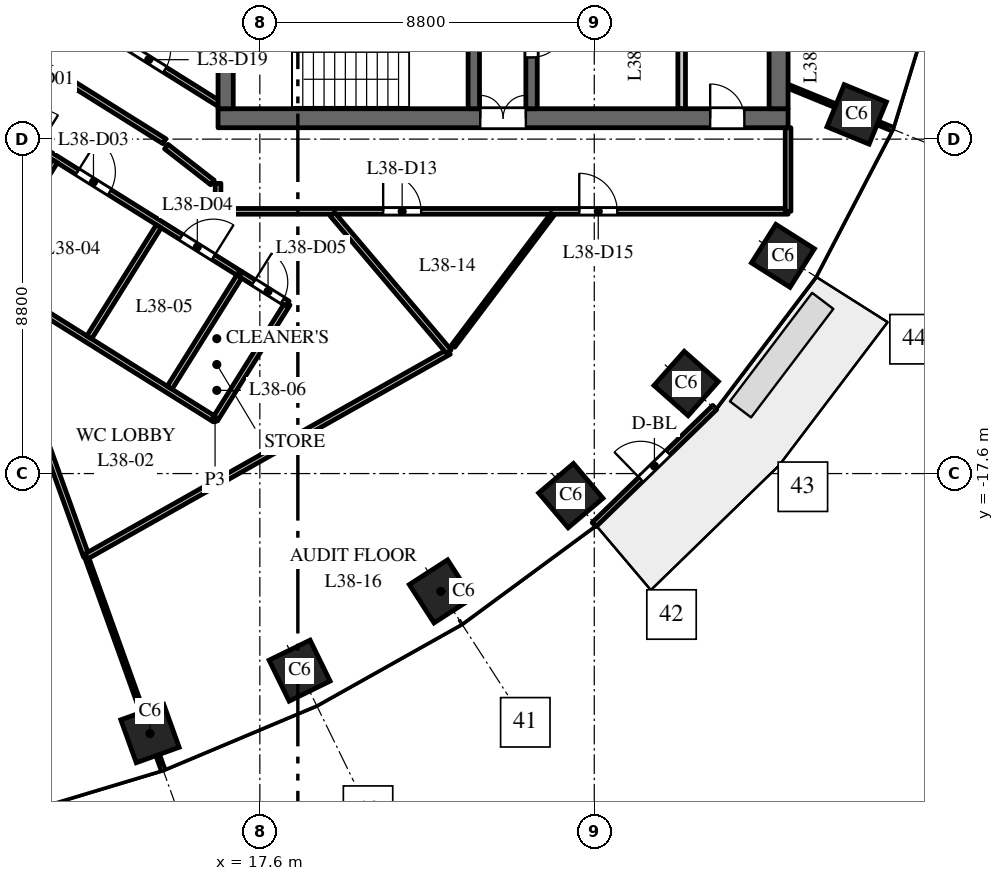
"""IFC4 building model, lengths in metres.
Left out: names, types, materials, properties, quantities, classifications, styles, units other than length and angle.
Written with IfcOpenShell. Run it as: python <this file> out.ifc"""

import sys

from ifc_helpers import new_model, si_unit, direction, frame, frame_2d, origin, origin_2d, place, context, subcontext, project, spatial, rectangle, extrude, element, fill, save


model = new_model("IFC4")
c1 = context("Model", 3, precision=1e-05, world=origin(), true_north=direction((0.0, 1.0)))
c2 = subcontext(c1, "Body", "Model", "MODEL_VIEW")
j1 = project(units=[si_unit("LENGTHUNIT", "METRE"), si_unit("PLANEANGLEUNIT", "RADIAN")], contexts=[c1])
p1 = place(None, origin())
s1 = spatial("IfcSite", under=j1, at=p1, CompositionType="ELEMENT")
p2 = place(p1, origin())
s2 = spatial("IfcBuilding", under=s1, at=p2, CompositionType="ELEMENT")
p3 = place(p2, frame((0.0, 0.0, 166.0)))
s3 = spatial("IfcBuildingStorey", under=s2, at=p3, CompositionType="ELEMENT", Elevation=166.0)
for number, where, z_axis, x_axis in (
    (1, (14.709, -24.441, 0.0), (0.0, 0.0, 1.0), (0.941, 0.338, 0.0)),
    (2, (18.646, -22.785, 0.0), (0.0, 0.0, 1.0), (0.898, 0.439, 0.0)),
    (3, (22.362, -20.7, 0.0), (0.0, 0.0, 1.0), (0.84, 0.542, 0.0)),
    (4, (25.783, -18.18, 0.0), (0.0, 0.0, 1.0), (0.763, 0.646, 0.0)),
    (5, (28.819, -15.23, 0.0), (0.0, 0.0, 1.0), (0.663, 0.749, 0.0)),
    (6, (31.365, -11.871, 0.0), (0.0, 0.0, 1.0), (0.535, 0.845, 0.0)),
    (7, (33.305, -8.149, 0.0), (0.0, 0.0, 1.0), (0.379, 0.925, 0.0)),
):
    element("IfcColumn", number, at=place(p3, frame(where, z_axis=z_axis, x_axis=x_axis)), inside=s3, PredefinedType="COLUMN", context=c2, shape_type="SweptSolid", body=[
        extrude(rectangle(XDim=1.2, YDim=1.2, at=origin_2d()), origin(), (0.0, 0.0, 1.0), 4.0),
    ])
p4 = place(p3, frame((16.5, -8.25, 0.0), z_axis=(0.0, 0.0, 1.0), x_axis=(1.0, 0.0, 0.0)))
e8 = element("IfcWall", 8, at=p4, inside=s3, PredefinedType="SHEAR", context=c2, shape_type="SweptSolid", body=[
    extrude(rectangle(XDim=15.0, YDim=0.5, at=frame_2d((7.5, 0.0))), origin(), (0.0, 0.0, 1.0), 3.7),
])
p5 = place(p4, frame((6.9, 0.0, 0.0)))
e9 = element("IfcOpeningElement", 9, at=p5, cuts=e8, PredefinedType="OPENING", context=c2, shape_type="SweptSolid", body=[
    extrude(rectangle(XDim=1.2, YDim=2.1, at=frame_2d((0.6, 1.05))), frame((0.0, 0.26, 0.0), z_axis=(0.0, -1.0, 0.0), x_axis=(1.0, 0.0, 0.0)), (0.0, 0.0, 1.0), 0.52),
])
p6 = place(p4, frame((12.95, 0.0, 0.0)))
e10 = element("IfcOpeningElement", 10, at=p6, cuts=e8, PredefinedType="OPENING", context=c2, shape_type="SweptSolid", body=[
    extrude(rectangle(XDim=0.9, YDim=2.1, at=frame_2d((0.45, 1.05))), frame((0.0, 0.26, 0.0), z_axis=(0.0, -1.0, 0.0), x_axis=(1.0, 0.0, 0.0)), (0.0, 0.0, 1.0), 0.52),
])
p7 = place(p3, frame((24.75, -8.0, 0.0), z_axis=(0.0, 0.0, 1.0), x_axis=(0.0, 1.0, 0.0)))
e11 = element("IfcWall", 11, at=p7, inside=s3, PredefinedType="SHEAR", context=c2, shape_type="SweptSolid", body=[
    extrude(rectangle(XDim=16.0, YDim=0.3, at=frame_2d((8.0, 0.0))), origin(), (0.0, 0.0, 1.0), 3.7),
])
p8 = place(p7, frame((4.425, 0.0, 0.0)))
e12 = element("IfcOpeningElement", 12, at=p8, cuts=e11, PredefinedType="OPENING", context=c2, shape_type="SweptSolid", body=[
    extrude(rectangle(XDim=1.1, YDim=2.1, at=frame_2d((0.55, 1.05))), frame((0.0, 0.16, 0.0), z_axis=(0.0, -1.0, 0.0), x_axis=(1.0, 0.0, 0.0)), (0.0, 0.0, 1.0), 0.32),
])
p9 = place(p7, frame((7.45, 0.0, 0.0)))
e13 = element("IfcOpeningElement", 13, at=p9, cuts=e11, PredefinedType="OPENING", context=c2, shape_type="SweptSolid", body=[
    extrude(rectangle(XDim=1.1, YDim=2.1, at=frame_2d((0.55, 1.05))), frame((0.0, 0.16, 0.0), z_axis=(0.0, -1.0, 0.0), x_axis=(1.0, 0.0, 0.0)), (0.0, 0.0, 1.0), 0.32),
])
p10 = place(p7, frame((10.475, 0.0, 0.0)))
e14 = element("IfcOpeningElement", 14, at=p10, cuts=e11, PredefinedType="OPENING", context=c2, shape_type="SweptSolid", body=[
    extrude(rectangle(XDim=1.1, YDim=2.1, at=frame_2d((0.55, 1.05))), frame((0.0, 0.16, 0.0), z_axis=(0.0, -1.0, 0.0), x_axis=(1.0, 0.0, 0.0)), (0.0, 0.0, 1.0), 0.32),
])
p11 = place(p7, frame((13.125, 0.0, 0.0)))
e15 = element("IfcOpeningElement", 15, at=p11, cuts=e11, PredefinedType="OPENING", context=c2, shape_type="SweptSolid", body=[
    extrude(rectangle(XDim=0.9, YDim=2.1, at=frame_2d((0.45, 1.05))), frame((0.0, 0.16, 0.0), z_axis=(0.0, -1.0, 0.0), x_axis=(1.0, 0.0, 0.0)), (0.0, 0.0, 1.0), 0.32),
])
p12 = place(p7, frame((14.75, 0.0, 0.0)))
e16 = element("IfcOpeningElement", 16, at=p12, cuts=e11, PredefinedType="OPENING", context=c2, shape_type="SweptSolid", body=[
    extrude(rectangle(XDim=0.9, YDim=2.1, at=frame_2d((0.45, 1.05))), frame((0.0, 0.16, 0.0), z_axis=(0.0, -1.0, 0.0), x_axis=(1.0, 0.0, 0.0)), (0.0, 0.0, 1.0), 0.32),
])
p13 = place(p7, frame((1.35, 0.0, 0.0)))
e17 = element("IfcOpeningElement", 17, at=p13, cuts=e11, PredefinedType="OPENING", context=c2, shape_type="SweptSolid", body=[
    extrude(rectangle(XDim=0.9, YDim=2.1, at=frame_2d((0.45, 1.05))), frame((0.0, 0.16, 0.0), z_axis=(0.0, -1.0, 0.0), x_axis=(1.0, 0.0, 0.0)), (0.0, 0.0, 1.0), 0.32),
])
p14 = place(p3, frame((16.7, -8.0, 0.0), z_axis=(0.0, 0.0, 1.0), x_axis=(0.0, 1.0, 0.0)))
e18 = element("IfcWall", 18, at=p14, inside=s3, PredefinedType="SHEAR", context=c2, shape_type="SweptSolid", body=[
    extrude(rectangle(XDim=16.0, YDim=0.4, at=frame_2d((8.0, 0.0))), origin(), (0.0, 0.0, 1.0), 3.7),
])
p15 = place(p3, frame((31.25, -8.0, 0.0), z_axis=(0.0, 0.0, 1.0), x_axis=(0.0, 1.0, 0.0)))
e19 = element("IfcWall", 19, at=p15, inside=s3, PredefinedType="SHEAR", context=c2, shape_type="SweptSolid", body=[
    extrude(rectangle(XDim=16.0, YDim=0.5, at=frame_2d((8.0, 0.0))), origin(), (0.0, 0.0, 1.0), 3.7),
])
p16 = place(p3, frame((28.7, -8.0, 0.0), z_axis=(0.0, 0.0, 1.0), x_axis=(0.0, 1.0, 0.0)))
e20 = element("IfcWall", 20, at=p16, inside=s3, PredefinedType="PARTITIONING", context=c2, shape_type="SweptSolid", body=[
    extrude(rectangle(XDim=3.25, YDim=0.2, at=frame_2d((1.625, 0.0))), origin(), (0.0, 0.0, 1.0), 3.7),
])
p17 = place(p3, frame((23.23, -8.0, 0.0), z_axis=(0.0, 0.0, 1.0), x_axis=(0.0, 1.0, 0.0)))
e21 = element("IfcWall", 21, at=p17, inside=s3, PredefinedType="SHEAR", context=c2, shape_type="SweptSolid", body=[
    extrude(rectangle(XDim=7.875, YDim=0.3, at=frame_2d((3.938, 0.0))), origin(), (0.0, 0.0, 1.0), 3.7),
])
p18 = place(p17, frame((5.15, 0.0, 0.0)))
e22 = element("IfcOpeningElement", 22, at=p18, cuts=e21, PredefinedType="OPENING", context=c2, shape_type="SweptSolid", body=[
    extrude(rectangle(XDim=1.1, YDim=2.1, at=frame_2d((0.55, 1.05))), frame((0.0, 0.16, 0.0), z_axis=(0.0, -1.0, 0.0), x_axis=(1.0, 0.0, 0.0)), (0.0, 0.0, 1.0), 0.32),
])
p19 = place(p3, frame((26.396, -18.943, 0.0), z_axis=(0.0, 0.0, 1.0), x_axis=(0.717214761864, 0.696852197647, 0.0)))
e23 = element("IfcWall", 23, at=p19, inside=s3, PredefinedType="STANDARD", context=c2, shape_type="SweptSolid", body=[
    extrude(rectangle(XDim=4.424, YDim=0.15, at=frame_2d((2.212, 0.0))), origin(), (0.0, 0.0, 1.0), 3.7),
])
p20 = place(p19, frame((1.712, 0.0, 0.0)))
e24 = element("IfcOpeningElement", 24, at=p20, cuts=e23, PredefinedType="OPENING", context=c2, shape_type="SweptSolid", body=[
    extrude(rectangle(XDim=1.0, YDim=2.4, at=frame_2d((0.5, 1.2))), frame((0.0, 0.085, 0.0), z_axis=(0.0, -1.0, 0.0), x_axis=(1.0, 0.0, 0.0)), (0.0, 0.0, 1.0), 0.17),
])
p21 = place(p3, frame((7.608, -10.661, 0.0), z_axis=(0.0, 0.0, 1.0), x_axis=(0.847562482532, -0.530695617284, 0.0)))
e25 = element("IfcWall", 25, at=p21, inside=s3, PredefinedType="PARTITIONING", context=c2, shape_type="SweptSolid", body=[
    extrude(rectangle(XDim=10.392, YDim=0.15, at=frame_2d((5.196, 0.0))), origin(), (0.0, 0.0, 1.0), 3.7),
])
p22 = place(p3, frame((9.514, -7.61, 0.0), z_axis=(0.0, 0.0, 1.0), x_axis=(0.847740567707, -0.530411095155, 0.0)))
e26 = element("IfcWall", 26, at=p22, inside=s3, PredefinedType="PARTITIONING", context=c2, shape_type="SweptSolid", body=[
    extrude(rectangle(XDim=8.944, YDim=0.15, at=frame_2d((4.472, 0.0))), origin(), (0.0, 0.0, 1.0), 3.7),
])
p23 = place(p22, frame((1.65, 0.0, 0.0)))
e27 = element("IfcOpeningElement", 27, at=p23, cuts=e26, PredefinedType="OPENING", context=c2, shape_type="SweptSolid", body=[
    extrude(rectangle(XDim=1.0, YDim=2.1, at=frame_2d((0.5, 1.05))), frame((0.0, 0.085, 0.0), z_axis=(0.0, -1.0, 0.0), x_axis=(1.0, 0.0, 0.0)), (0.0, 0.0, 1.0), 0.17),
])
p24 = place(p22, frame((3.874, 0.0, 0.0)))
e28 = element("IfcOpeningElement", 28, at=p24, cuts=e26, PredefinedType="OPENING", context=c2, shape_type="SweptSolid", body=[
    extrude(rectangle(XDim=1.0, YDim=2.1, at=frame_2d((0.5, 1.05))), frame((0.0, 0.085, 0.0), z_axis=(0.0, -1.0, 0.0), x_axis=(1.0, 0.0, 0.0)), (0.0, 0.0, 1.0), 0.17),
])
p25 = place(p22, frame((7.098, 0.0, 0.0)))
e29 = element("IfcOpeningElement", 29, at=p25, cuts=e26, PredefinedType="OPENING", context=c2, shape_type="SweptSolid", body=[
    extrude(rectangle(XDim=1.0, YDim=2.1, at=frame_2d((0.5, 1.05))), frame((0.0, 0.085, 0.0), z_axis=(0.0, -1.0, 0.0), x_axis=(1.0, 0.0, 0.0)), (0.0, 0.0, 1.0), 0.17),
])
p26 = place(p3, frame((9.679, -5.469, 0.0), z_axis=(0.0, 0.0, 1.0), x_axis=(0.847602682855, -0.530631408811, 0.0)))
e30 = element("IfcWall", 30, at=p26, inside=s3, PredefinedType="PARTITIONING", context=c2, shape_type="SweptSolid", body=[
    extrude(rectangle(XDim=6.383, YDim=0.15, at=frame_2d((3.191, 0.0))), origin(), (0.0, 0.0, 1.0), 3.7),
])
p27 = place(p26, frame((0.65, 0.0, 0.0)))
e31 = element("IfcOpeningElement", 31, at=p27, cuts=e30, PredefinedType="OPENING", context=c2, shape_type="SweptSolid", body=[
    extrude(rectangle(XDim=1.0, YDim=2.1, at=frame_2d((0.5, 1.05))), frame((0.0, 0.085, 0.0), z_axis=(0.0, -1.0, 0.0), x_axis=(1.0, 0.0, 0.0)), (0.0, 0.0, 1.0), 0.17),
])
p28 = place(p3, frame((10.377, -12.306, 0.0), z_axis=(0.0, 0.0, 1.0), x_axis=(0.530889428354, 0.847441098167, 0.0)))
e32 = element("IfcWall", 32, at=p28, inside=s3, PredefinedType="PARTITIONING", context=c2, shape_type="SweptSolid", body=[
    extrude(rectangle(XDim=3.449, YDim=0.15, at=frame_2d((1.725, 0.0))), origin(), (0.0, 0.0, 1.0), 3.7),
])
p29 = place(p3, frame((10.752, -4.254, 0.0), z_axis=(0.0, 0.0, 1.0), x_axis=(0.847690706888, -0.530490777917, 0.0)))
e33 = element("IfcWall", 33, at=p29, inside=s3, PredefinedType="PARTITIONING", context=c2, shape_type="SweptSolid", body=[
    extrude(rectangle(XDim=6.781, YDim=0.15, at=frame_2d((3.39, 0.0))), origin(), (0.0, 0.0, 1.0), 3.7),
])
p30 = place(p29, frame((4.129, 0.0, 0.0)))
e34 = element("IfcOpeningElement", 34, at=p30, cuts=e33, PredefinedType="OPENING", context=c2, shape_type="SweptSolid", body=[
    extrude(rectangle(XDim=1.0, YDim=2.1, at=frame_2d((0.5, 1.05))), frame((0.0, 0.085, 0.0), z_axis=(0.0, -1.0, 0.0), x_axis=(1.0, 0.0, 0.0)), (0.0, 0.0, 1.0), 0.17),
])
p31 = place(p3, frame((11.429, -15.32, 0.0), z_axis=(0.0, 0.0, 1.0), x_axis=(0.338520464006, -0.940959029634, 0.0)))
e35 = element("IfcWall", 35, at=p31, inside=s3, PredefinedType="PARTITIONING", context=c2, shape_type="SweptSolid", body=[
    extrude(rectangle(XDim=4.735, YDim=0.15, at=frame_2d((2.368, 0.0))), origin(), (0.0, 0.0, 1.0), 3.7),
])
p32 = place(p3, frame((13.032, -19.776, 0.0), z_axis=(0.0, 0.0, 1.0), x_axis=(0.338352371411, -0.941019485856, 0.0)))
e36 = element("IfcWall", 36, at=p32, inside=s3, PredefinedType="PARTITIONING", context=c2, shape_type="SweptSolid", body=[
    extrude(rectangle(XDim=5.959, YDim=0.1, at=frame_2d((2.979, 0.0))), origin(), (0.0, 0.0, 1.0), 2.85),
])
p33 = place(p3, frame((13.034, -19.779, 0.0), z_axis=(0.0, 0.0, 1.0), x_axis=(0.870903388322, 0.491454258512, 0.0)))
e37 = element("IfcWall", 37, at=p33, inside=s3, PredefinedType="PARTITIONING", context=c2, shape_type="SweptSolid", body=[
    extrude(rectangle(XDim=10.955, YDim=0.15, at=frame_2d((5.478, 0.0))), origin(), (0.0, 0.0, 1.0), 3.7),
])
p34 = place(p3, frame((13.11, -14.017, 0.0), z_axis=(0.0, 0.0, 1.0), x_axis=(0.530603340991, 0.847620253727, 0.0)))
e38 = element("IfcWall", 38, at=p34, inside=s3, PredefinedType="PARTITIONING", context=c2, shape_type="SweptSolid", body=[
    extrude(rectangle(XDim=3.448, YDim=0.15, at=frame_2d((1.724, 0.0))), origin(), (0.0, 0.0, 1.0), 3.7),
])
p35 = place(p3, frame((15.226, -15.341, 0.0), z_axis=(0.0, 0.0, 1.0), x_axis=(0.530602850446, 0.847620560805, 0.0)))
e39 = element("IfcWall", 39, at=p35, inside=s3, PredefinedType="PARTITIONING", context=c2, shape_type="SweptSolid", body=[
    extrude(rectangle(XDim=3.524, YDim=0.15, at=frame_2d((1.762, 0.0))), origin(), (0.0, 0.0, 1.0), 3.7),
])
p36 = place(p3, frame((16.422, -16.175, 0.0), z_axis=(0.0, 0.0, 1.0), x_axis=(0.530578570881, 0.84763575911, 0.0)))
e40 = element("IfcWall", 40, at=p36, inside=s3, PredefinedType="PARTITIONING", context=c2, shape_type="SweptSolid", body=[
    extrude(rectangle(XDim=3.596, YDim=0.15, at=frame_2d((1.798, 0.0))), origin(), (0.0, 0.0, 1.0), 3.7),
])
p37 = place(p3, frame((16.5, -10.7, 0.0), z_axis=(0.0, 0.0, 1.0), x_axis=(0.0, 1.0, 0.0)))
e41 = element("IfcWall", 41, at=p37, inside=s3, PredefinedType="PARTITIONING", context=c2, shape_type="SweptSolid", body=[
    extrude(rectangle(XDim=0.736, YDim=0.15, at=frame_2d((0.368, 0.0))), origin(), (0.0, 0.0, 1.0), 3.7),
])
p38 = place(p3, frame((16.5, -10.7, 0.0), z_axis=(0.0, 0.0, 1.0), x_axis=(1.0, 0.0, 0.0)))
e42 = element("IfcWall", 42, at=p38, inside=s3, PredefinedType="PARTITIONING", context=c2, shape_type="SweptSolid", body=[
    extrude(rectangle(XDim=15.0, YDim=0.15, at=frame_2d((7.5, 0.0))), origin(), (0.0, 0.0, 1.0), 2.75),
])
p39 = place(p38, frame((4.345, 0.0, 0.0)))
e43 = element("IfcOpeningElement", 43, at=p39, cuts=e42, PredefinedType="OPENING", context=c2, shape_type="SweptSolid", body=[
    extrude(rectangle(XDim=1.0, YDim=2.1, at=frame_2d((0.5, 1.05))), frame((0.0, 0.085, 0.0), z_axis=(0.0, -1.0, 0.0), x_axis=(1.0, 0.0, 0.0)), (0.0, 0.0, 1.0), 0.17),
])
p40 = place(p38, frame((9.505, 0.0, 0.0)))
e44 = element("IfcOpeningElement", 44, at=p40, cuts=e42, PredefinedType="OPENING", context=c2, shape_type="SweptSolid", body=[
    extrude(rectangle(XDim=1.0, YDim=2.1, at=frame_2d((0.5, 1.05))), frame((0.0, 0.085, 0.0), z_axis=(0.0, -1.0, 0.0), x_axis=(1.0, 0.0, 0.0)), (0.0, 0.0, 1.0), 0.17),
])
p41 = place(p3, frame((17.096, -12.354, 0.0), z_axis=(0.0, 0.0, 1.0), x_axis=(0.847498728789, -0.530797423412, 0.0)))
e45 = element("IfcWall", 45, at=p41, inside=s3, PredefinedType="PARTITIONING", context=c2, shape_type="SweptSolid", body=[
    extrude(rectangle(XDim=1.456, YDim=0.15, at=frame_2d((0.728, 0.0))), origin(), (0.0, 0.0, 1.0), 3.7),
])
p42 = place(p41, frame((0.4, 0.0, 0.0)))
e46 = element("IfcOpeningElement", 46, at=p42, cuts=e45, PredefinedType="OPENING", context=c2, shape_type="SweptSolid", body=[
    extrude(rectangle(XDim=0.9, YDim=2.1, at=frame_2d((0.45, 1.05))), frame((0.0, 0.085, 0.0), z_axis=(0.0, -1.0, 0.0), x_axis=(1.0, 0.0, 0.0)), (0.0, 0.0, 1.0), 0.17),
])
p43 = place(p3, frame((19.511, -10.778, 0.0), z_axis=(0.0, 0.0, 1.0), x_axis=(0.646369264436, -0.763024753197, 0.0)))
e47 = element("IfcWall", 47, at=p43, inside=s3, PredefinedType="PARTITIONING", context=c2, shape_type="SweptSolid", body=[
    extrude(rectangle(XDim=4.74, YDim=0.15, at=frame_2d((2.37, 0.0))), origin(), (0.0, 0.0, 1.0), 3.7),
])
p44 = place(p3, frame((22.688, -14.245, 0.0), z_axis=(0.0, 0.0, 1.0), x_axis=(0.6020222506, 0.798479310804, 0.0)))
e48 = element("IfcWall", 48, at=p44, inside=s3, PredefinedType="PARTITIONING", context=c2, shape_type="SweptSolid", body=[
    extrude(rectangle(XDim=4.342, YDim=0.1, at=frame_2d((2.171, 0.0))), origin(), (0.0, 0.0, 1.0), 2.75),
])
p45 = place(p3, frame((31.5, -10.7, 0.0), z_axis=(0.0, 0.0, 1.0), x_axis=(0.0, 1.0, 0.0)))
e49 = element("IfcWall", 49, at=p45, inside=s3, PredefinedType="PARTITIONING", context=c2, shape_type="SweptSolid", body=[
    extrude(rectangle(XDim=2.2, YDim=0.15, at=frame_2d((1.1, 0.0))), origin(), (0.0, 0.0, 1.0), 2.9),
])
p46 = place(p3, frame((31.5, -7.41, 0.0), z_axis=(0.0, 0.0, 1.0), x_axis=(0.925344112436, -0.379128307542, 0.0)))
e50 = element("IfcWall", 50, at=p46, inside=s3, PredefinedType="PARTITIONING", context=c2, shape_type="SweptSolid", body=[
    extrude(rectangle(XDim=2.954, YDim=0.1, at=frame_2d((1.477, 0.0))), origin(), (0.0, 0.0, 1.0), 3.7),
])
p47 = place(p3, frame((16.352, -9.942, 0.0), z_axis=(0.0, 0.0, 1.0), x_axis=(-0.788950226826, 0.614457109643, 0.0)))
e51 = element("IfcWall", 51, at=p47, inside=s3, PredefinedType="PARTITIONING", context=c2, shape_type="SweptSolid", body=[
    extrude(rectangle(XDim=1.538, YDim=0.15, at=frame_2d((0.769, 0.0))), origin(), (0.0, 0.0, 1.0), 3.7),
])
p48 = place(p5, origin())
e52 = element("IfcDoor", 52, at=p48, inside=s3, OperationType="DOUBLE_DOOR_DOUBLE_SWING", PredefinedType="DOOR", context=c2, shape_type="SweptSolid", body=[
    extrude(rectangle(XDim=1.2, YDim=2.1, at=frame_2d((0.6, 1.05))), frame((0.0, 0.025, 0.0), z_axis=(0.0, -1.0, 0.0), x_axis=(1.0, 0.0, 0.0)), (0.0, 0.0, 1.0), 0.05),
])
fill(e9, e52)
p49 = place(p13, origin())
e53 = element("IfcDoor", 53, at=p49, inside=s3, OperationType="SINGLE_SWING_RIGHT", PredefinedType="DOOR", context=c2, shape_type="SweptSolid", body=[
    extrude(rectangle(XDim=0.9, YDim=2.1, at=frame_2d((0.45, 1.05))), frame((0.0, 0.025, 0.0), z_axis=(0.0, -1.0, 0.0), x_axis=(1.0, 0.0, 0.0)), (0.0, 0.0, 1.0), 0.05),
])
fill(e17, e53)
p50 = place(p6, origin())
e54 = element("IfcDoor", 54, at=p50, inside=s3, OperationType="SINGLE_SWING_RIGHT", PredefinedType="DOOR", context=c2, shape_type="SweptSolid", body=[
    extrude(rectangle(XDim=0.9, YDim=2.1, at=frame_2d((0.45, 1.05))), frame((0.0, 0.025, 0.0), z_axis=(0.0, -1.0, 0.0), x_axis=(1.0, 0.0, 0.0)), (0.0, 0.0, 1.0), 0.05),
])
fill(e10, e54)
p51 = place(p20, origin())
e55 = element("IfcDoor", 55, at=p51, inside=s3, OperationType="SINGLE_SWING_LEFT", PredefinedType="DOOR", context=c2, shape_type="SweptSolid", body=[
    extrude(rectangle(XDim=1.0, YDim=2.4, at=frame_2d((0.5, 1.2))), frame((0.0, 0.025, 0.0), z_axis=(0.0, -1.0, 0.0), x_axis=(1.0, 0.0, 0.0)), (0.0, 0.0, 1.0), 0.05),
])
fill(e24, e55)
p52 = place(p24, origin())
e56 = element("IfcDoor", 56, at=p52, inside=s3, OperationType="SINGLE_SWING_LEFT", PredefinedType="DOOR", context=c2, shape_type="SweptSolid", body=[
    extrude(rectangle(XDim=1.0, YDim=2.1, at=frame_2d((0.5, 1.05))), frame((0.0, 0.025, 0.0), z_axis=(0.0, -1.0, 0.0), x_axis=(1.0, 0.0, 0.0)), (0.0, 0.0, 1.0), 0.05),
])
fill(e28, e56)
p53 = place(p25, origin())
e57 = element("IfcDoor", 57, at=p53, inside=s3, OperationType="SINGLE_SWING_RIGHT", PredefinedType="DOOR", context=c2, shape_type="SweptSolid", body=[
    extrude(rectangle(XDim=1.0, YDim=2.1, at=frame_2d((0.5, 1.05))), frame((0.0, 0.025, 0.0), z_axis=(0.0, -1.0, 0.0), x_axis=(1.0, 0.0, 0.0)), (0.0, 0.0, 1.0), 0.05),
])
fill(e29, e57)
p54 = place(p42, origin())
e58 = element("IfcDoor", 58, at=p54, inside=s3, OperationType="SINGLE_SWING_LEFT", PredefinedType="DOOR", context=c2, shape_type="SweptSolid", body=[
    extrude(rectangle(XDim=0.9, YDim=2.1, at=frame_2d((0.45, 1.05))), frame((0.0, 0.025, 0.0), z_axis=(0.0, -1.0, 0.0), x_axis=(1.0, 0.0, 0.0)), (0.0, 0.0, 1.0), 0.05),
])
fill(e46, e58)
p55 = place(p39, origin())
e59 = element("IfcDoor", 59, at=p55, inside=s3, OperationType="SINGLE_SWING_LEFT", PredefinedType="DOOR", context=c2, shape_type="SweptSolid", body=[
    extrude(rectangle(XDim=1.0, YDim=2.1, at=frame_2d((0.5, 1.05))), frame((0.0, 0.025, 0.0), z_axis=(0.0, -1.0, 0.0), x_axis=(1.0, 0.0, 0.0)), (0.0, 0.0, 1.0), 0.05),
])
fill(e43, e59)
p56 = place(p40, origin())
e60 = element("IfcDoor", 60, at=p56, inside=s3, OperationType="SINGLE_SWING_LEFT", PredefinedType="DOOR", context=c2, shape_type="SweptSolid", body=[
    extrude(rectangle(XDim=1.0, YDim=2.1, at=frame_2d((0.5, 1.05))), frame((0.0, 0.025, 0.0), z_axis=(0.0, -1.0, 0.0), x_axis=(1.0, 0.0, 0.0)), (0.0, 0.0, 1.0), 0.05),
])
fill(e44, e60)
p57 = place(p30, origin())
e61 = element("IfcDoor", 61, at=p57, inside=s3, OperationType="SINGLE_SWING_LEFT", PredefinedType="DOOR", context=c2, shape_type="SweptSolid", body=[
    extrude(rectangle(XDim=1.0, YDim=2.1, at=frame_2d((0.5, 1.05))), frame((0.0, 0.025, 0.0), z_axis=(0.0, -1.0, 0.0), x_axis=(1.0, 0.0, 0.0)), (0.0, 0.0, 1.0), 0.05),
])
fill(e34, e61)
save(model, sys.argv[1])
